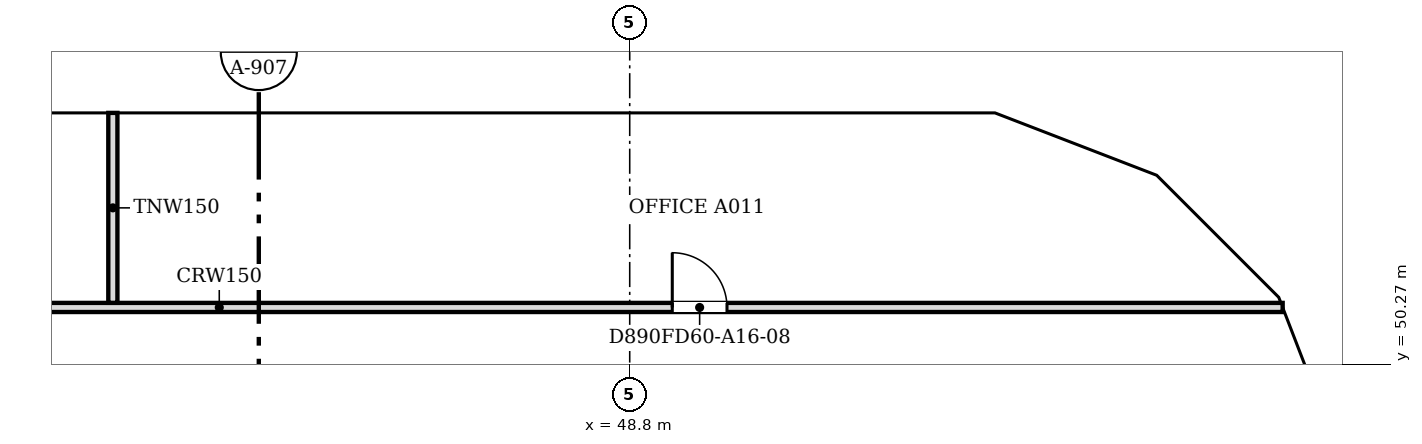
"""IFC4 building model, lengths in metres.
Left out: names, types, materials, properties, quantities, classifications, styles, units other than length and angle.
Written with IfcOpenShell. Run it as: python <this file> out.ifc"""

import sys

from ifc_helpers import new_model, si_unit, direction, frame, frame_2d, origin, place, context, subcontext, project, spatial, polyline, rectangle, outline, extrude, faceted_brep, source, transform, mapped, element, fill, save


model = new_model("IFC4")
c1 = context("Model", 3, precision=1e-05, world=origin(), true_north=direction((0.0, 1.0)))
c2 = subcontext(c1, "Body", "Model", "MODEL_VIEW")
j1 = project(units=[si_unit("LENGTHUNIT", "METRE"), si_unit("PLANEANGLEUNIT", "RADIAN")], contexts=[c1])
p1 = place(None, origin())
s1 = spatial("IfcSite", under=j1, at=p1, CompositionType="ELEMENT")
p2 = place(p1, origin())
s2 = spatial("IfcBuilding", under=s1, at=p2, CompositionType="ELEMENT")
p3 = place(p2, frame((0.0, 0.0, 178.2)))
s3 = spatial("IfcBuildingStorey", under=s2, at=p3, CompositionType="ELEMENT", Elevation=178.2)
m1 = source(origin(), c2, "Body", "Brep", [
    faceted_brep([(2.95, -0.25, 0.0), (3.003, -0.25, 0.068), (3.003, -0.25, 7.532), (2.95, -0.25, 7.6), (0.0, -0.25, 3.8), (0.047, 0.25, 3.86), (2.898, 0.25, 7.532), (2.898, 0.25, 0.068), (0.047, 0.25, 3.74), (2.95, 0.0, 0.0), (2.95, 0.0, 7.6), (0.0, 0.0, 3.8)], [[[0, 1, 2, 3, 4]], [[5, 6, 7, 8]], [[1, 0, 9]], [[10, 3, 2]], [[6, 5, 11, 4, 3, 10]], [[8, 7, 9, 0, 4, 11]], [[8, 11, 5]], [[1, 9, 7, 6, 10, 2]]]),
])
p4 = place(p3, frame((60.75, 48.753, -3.8), z_axis=(0.0, 0.0, 1.0), x_axis=(-0.35992665181, 0.932980602862, 0.0)))
e1 = element("IfcWall", 1, at=p4, inside=s3, PredefinedType="SOLIDWALL", context=c2, shape_type="MappedRepresentation", body=[
    mapped(m1, transform((0.0, 0.0, 0.0), scale=1.0)),
])
m2 = source(origin(), c2, "Body", "SweptSolid", [
    extrude(outline(polyline([(2.75, 6.935), (0.316, 3.8), (2.75, 0.665), (2.75, 6.935)])), frame((0.0, 0.26, 0.0), z_axis=(0.0, -1.0, 0.0), x_axis=(1.0, 0.0, 0.0)), (0.0, 0.0, 1.0), 0.52),
])
p5 = place(p4, origin())
e2 = element("IfcOpeningElement", 2, at=p5, cuts=e1, PredefinedType="OPENING", context=c2, shape_type="MappedRepresentation", body=[
    mapped(m2, transform((0.0, 0.0, 0.0), scale=1.0)),
])
m3 = source(origin(), c2, "Body", "Brep", [
    faceted_brep([(0.053, -0.25, 0.0), (2.997, -0.25, 3.8), (0.053, -0.25, 7.6), (0.0, -0.25, 7.532), (0.0, -0.25, 0.068), (0.106, 0.25, 7.532), (2.944, 0.25, 3.868), (2.944, 0.25, 3.732), (0.106, 0.25, 0.068), (2.997, 0.0, 3.8), (0.053, 0.0, 0.0), (0.053, 0.0, 7.6)], [[[0, 1, 2, 3, 4]], [[5, 6, 7, 8]], [[8, 7, 9, 1, 0, 10]], [[6, 5, 11, 2, 1, 9]], [[3, 2, 11]], [[10, 0, 4]], [[8, 10, 4, 3, 11, 5]], [[9, 7, 6]]]),
])
p6 = place(p3, frame((59.726, 51.469, -3.8), z_axis=(0.0, 0.0, 1.0), x_axis=(-0.707106781187, 0.707106781187, 0.0)))
e3 = element("IfcWall", 3, at=p6, inside=s3, PredefinedType="SOLIDWALL", context=c2, shape_type="MappedRepresentation", body=[
    mapped(m3, transform((0.0, 0.0, 0.0), scale=1.0)),
])
m4 = source(origin(), c2, "Body", "SweptSolid", [
    extrude(outline(polyline([(0.253, 0.667), (2.681, 3.8), (0.253, 6.934), (0.253, 0.667)])), frame((0.0, 0.26, 0.0), z_axis=(0.0, -1.0, 0.0), x_axis=(1.0, 0.0, 0.0)), (0.0, 0.0, 1.0), 0.52),
])
p7 = place(p6, origin())
e4 = element("IfcOpeningElement", 4, at=p7, cuts=e3, PredefinedType="OPENING", context=c2, shape_type="MappedRepresentation", body=[
    mapped(m4, transform((0.0, 0.0, 0.0), scale=1.0)),
])
m5 = source(origin(), c2, "Body", "Brep", [
    faceted_brep([(2.95, -0.25, 0.0), (2.997, -0.25, 0.059), (2.997, -0.25, 7.541), (2.95, -0.25, 7.6), (0.0, -0.25, 3.8), (0.053, 0.25, 3.868), (2.904, 0.25, 7.54), (2.904, 0.25, 0.06), (0.053, 0.25, 3.732), (2.95, 0.0, 0.0), (2.95, 0.0, 7.6), (0.0, 0.0, 3.8)], [[[0, 1, 2, 3, 4]], [[5, 6, 7, 8]], [[1, 0, 9]], [[10, 3, 2]], [[6, 5, 11, 4, 3, 10]], [[8, 7, 9, 0, 4, 11]], [[8, 11, 5]], [[1, 9, 7, 6, 10, 2]]]),
])
p8 = place(p3, frame((57.606, 53.588, -3.8), z_axis=(0.0, 0.0, 1.0), x_axis=(-0.932990326376, 0.359901446078, 0.0)))
e5 = element("IfcWall", 5, at=p8, inside=s3, PredefinedType="SOLIDWALL", context=c2, shape_type="MappedRepresentation", body=[
    mapped(m5, transform((0.0, 0.0, 0.0), scale=1.0)),
])
p9 = place(p8, origin())
e6 = element("IfcOpeningElement", 6, at=p9, cuts=e5, PredefinedType="OPENING", context=c2, shape_type="MappedRepresentation", body=[
    mapped(m2, transform((0.0, 0.0, 0.0), scale=1.0)),
])
m6 = source(origin(), c2, "Body", "Brep", [
    faceted_brep([(0.047, -0.25, 0.0), (3.05, -0.25, 3.8), (0.047, -0.25, 7.6), (0.0, -0.25, 7.54), (0.0, -0.25, 0.06), (0.093, 0.25, 7.541), (3.05, 0.25, 3.8), (0.093, 0.25, 0.059), (0.047, 0.0, 0.0), (0.047, 0.0, 7.6)], [[[0, 1, 2, 3, 4]], [[5, 6, 7]], [[7, 6, 1, 0, 8]], [[6, 5, 9, 2, 1]], [[3, 2, 9]], [[8, 0, 4]], [[7, 8, 4, 3, 9, 5]]]),
])
p10 = place(p3, frame((54.9, 54.65, -3.8), z_axis=(0.0, 0.0, 1.0), x_axis=(-1.0, 0.0, 0.0)))
e7 = element("IfcWall", 7, at=p10, inside=s3, PredefinedType="SOLIDWALL", context=c2, shape_type="MappedRepresentation", body=[
    mapped(m6, transform((0.0, 0.0, 0.0), scale=1.0)),
])
m7 = source(origin(), c2, "Body", "SweptSolid", [
    extrude(outline(polyline([(0.247, 0.656), (2.731, 3.8), (0.247, 6.944), (0.247, 0.656)])), frame((0.0, 0.26, 0.0), z_axis=(0.0, -1.0, 0.0), x_axis=(1.0, 0.0, 0.0)), (0.0, 0.0, 1.0), 0.52),
])
p11 = place(p10, origin())
e8 = element("IfcOpeningElement", 8, at=p11, cuts=e7, PredefinedType="OPENING", context=c2, shape_type="MappedRepresentation", body=[
    mapped(m7, transform((0.0, 0.0, 0.0), scale=1.0)),
])
m8 = source(origin(), c2, "Body", "SweptSolid", [
    extrude(outline(polyline([(3.05, 0.0), (6.1, 3.8), (3.05, 7.6), (0.0, 3.8), (3.05, 0.0)])), frame((0.0, 0.25, 0.0), z_axis=(0.0, -1.0, 0.0), x_axis=(1.0, 0.0, 0.0)), (0.0, 0.0, 1.0), 0.5),
])
p12 = place(p3, frame((51.85, 54.65, -3.8), z_axis=(0.0, 0.0, 1.0), x_axis=(-1.0, 0.0, 0.0)))
e9 = element("IfcWall", 9, at=p12, inside=s3, PredefinedType="SOLIDWALL", context=c2, shape_type="MappedRepresentation", body=[
    mapped(m8, transform((0.0, 0.0, 0.0), scale=1.0)),
])
m9 = source(origin(), c2, "Body", "SweptSolid", [
    extrude(outline(polyline([(3.05, 0.399), (5.78, 3.8), (3.05, 7.201), (0.321, 3.8), (3.05, 0.399)])), frame((0.0, 0.26, 0.0), z_axis=(0.0, -1.0, 0.0), x_axis=(1.0, 0.0, 0.0)), (0.0, 0.0, 1.0), 0.52),
])
p13 = place(p12, origin())
e10 = element("IfcOpeningElement", 10, at=p13, cuts=e9, PredefinedType="OPENING", context=c2, shape_type="MappedRepresentation", body=[
    mapped(m9, transform((0.0, 0.0, 0.0), scale=1.0)),
])
p14 = place(p3, frame((45.75, 54.65, -3.8), z_axis=(0.0, 0.0, 1.0), x_axis=(-1.0, 0.0, 0.0)))
e11 = element("IfcWall", 11, at=p14, inside=s3, PredefinedType="SOLIDWALL", context=c2, shape_type="MappedRepresentation", body=[
    mapped(m8, transform((0.0, 0.0, 0.0), scale=1.0)),
])
p15 = place(p14, origin())
e12 = element("IfcOpeningElement", 12, at=p15, cuts=e11, PredefinedType="OPENING", context=c2, shape_type="MappedRepresentation", body=[
    mapped(m9, transform((0.0, 0.0, 0.0), scale=1.0)),
])
m10 = source(origin(), c2, "Body", "Brep", [
    faceted_brep([(3.05, -0.25, 0.0), (6.1, -0.25, 3.8), (6.1, -0.25, 3.8), (3.05, -0.25, 7.6), (0.0, -0.25, 3.8), (0.0, 0.25, 3.8), (3.05, 0.25, 7.6), (6.1, 0.25, 3.8), (6.1, 0.25, 3.8), (3.05, 0.25, 0.0)], [[[0, 1, 2, 3, 4]], [[5, 6, 7, 8, 9]], [[9, 8, 1, 0]], [[7, 6, 3, 2]], [[6, 5, 4, 3]], [[5, 9, 0, 4]], [[1, 8, 7, 2]]]),
])
p16 = place(p3, frame((39.65, 54.65, -3.8), z_axis=(0.0, 0.0, 1.0), x_axis=(-1.0, 0.0, 0.0)))
e13 = element("IfcWall", 13, at=p16, inside=s3, PredefinedType="SOLIDWALL", context=c2, shape_type="MappedRepresentation", body=[
    mapped(m10, transform((0.0, 0.0, 0.0), scale=1.0)),
])
p17 = place(p16, origin())
e14 = element("IfcOpeningElement", 14, at=p17, cuts=e13, PredefinedType="OPENING", context=c2, shape_type="MappedRepresentation", body=[
    mapped(m9, transform((0.0, 0.0, 0.0), scale=1.0)),
])
p18 = place(p2, frame((0.0, 0.0, 182.0)))
s4 = spatial("IfcBuildingStorey", under=s2, at=p18, CompositionType="ELEMENT", Elevation=182.0)
m11 = source(origin(), c2, "Body", "Brep", [
    faceted_brep([(0.047, -0.25, 0.0), (2.997, -0.25, 3.8), (0.047, -0.25, 7.6), (0.0, -0.25, 7.541), (0.0, -0.25, 0.059), (0.093, 0.25, 7.54), (2.944, 0.25, 3.868), (2.944, 0.25, 3.732), (0.093, 0.25, 0.06), (2.997, 0.0, 3.8), (0.047, 0.0, 0.0), (0.047, 0.0, 7.6)], [[[0, 1, 2, 3, 4]], [[5, 6, 7, 8]], [[8, 7, 9, 1, 0, 10]], [[6, 5, 11, 2, 1, 9]], [[3, 2, 11]], [[10, 0, 4]], [[8, 10, 4, 3, 11, 5]], [[9, 7, 6]]]),
])
p19 = place(p18, frame((60.767, 48.71, -3.8), z_axis=(0.0, 0.0, 1.0), x_axis=(-0.359901446078, 0.932990326376, 0.0)))
e15 = element("IfcWall", 15, at=p19, inside=s4, PredefinedType="SOLIDWALL", context=c2, shape_type="MappedRepresentation", body=[
    mapped(m11, transform((0.0, 0.0, 0.0), scale=1.0)),
])
m12 = source(origin(), c2, "Body", "SweptSolid", [
    extrude(outline(polyline([(0.247, 0.665), (2.681, 3.8), (0.247, 6.935), (0.247, 0.665)])), frame((0.0, 0.26, 0.0), z_axis=(0.0, -1.0, 0.0), x_axis=(1.0, 0.0, 0.0)), (0.0, 0.0, 1.0), 0.52),
])
p20 = place(p19, origin())
e16 = element("IfcOpeningElement", 16, at=p20, cuts=e15, PredefinedType="OPENING", context=c2, shape_type="MappedRepresentation", body=[
    mapped(m12, transform((0.0, 0.0, 0.0), scale=1.0)),
])
m13 = source(origin(), c2, "Body", "Brep", [
    faceted_brep([(2.944, -0.25, 0.0), (2.997, -0.25, 0.068), (2.997, -0.25, 7.532), (2.944, -0.25, 7.6), (0.0, -0.25, 3.8), (0.053, 0.25, 3.868), (2.891, 0.25, 7.532), (2.891, 0.25, 0.068), (0.053, 0.25, 3.732), (2.944, 0.0, 0.0), (2.944, 0.0, 7.6), (0.0, 0.0, 3.8)], [[[0, 1, 2, 3, 4]], [[5, 6, 7, 8]], [[1, 0, 9]], [[10, 3, 2]], [[6, 5, 11, 4, 3, 10]], [[8, 7, 9, 0, 4, 11]], [[8, 11, 5]], [[1, 9, 7, 6, 10, 2]]]),
])
p21 = place(p18, frame((59.688, 51.506, -3.8), z_axis=(0.0, 0.0, 1.0), x_axis=(-0.707106781187, 0.707106781187, 0.0)))
e17 = element("IfcWall", 17, at=p21, inside=s4, PredefinedType="SOLIDWALL", context=c2, shape_type="MappedRepresentation", body=[
    mapped(m13, transform((0.0, 0.0, 0.0), scale=1.0)),
])
m14 = source(origin(), c2, "Body", "SweptSolid", [
    extrude(outline(polyline([(2.744, 6.934), (0.316, 3.8), (2.744, 0.666), (2.744, 6.934)])), frame((0.0, 0.26, 0.0), z_axis=(0.0, -1.0, 0.0), x_axis=(1.0, 0.0, 0.0)), (0.0, 0.0, 1.0), 0.52),
])
p22 = place(p21, origin())
e18 = element("IfcOpeningElement", 18, at=p22, cuts=e17, PredefinedType="OPENING", context=c2, shape_type="MappedRepresentation", body=[
    mapped(m14, transform((0.0, 0.0, 0.0), scale=1.0)),
])
m15 = source(origin(), c2, "Body", "Brep", [
    faceted_brep([(0.053, -0.25, 0.0), (3.003, -0.25, 3.8), (0.053, -0.25, 7.6), (0.0, -0.25, 7.532), (0.0, -0.25, 0.068), (0.106, 0.25, 7.532), (2.957, 0.25, 3.86), (2.957, 0.25, 3.74), (0.106, 0.25, 0.068), (3.003, 0.0, 3.8), (0.053, 0.0, 0.0), (0.053, 0.0, 7.6)], [[[0, 1, 2, 3, 4]], [[5, 6, 7, 8]], [[8, 7, 9, 1, 0, 10]], [[6, 5, 11, 2, 1, 9]], [[3, 2, 11]], [[10, 0, 4]], [[8, 10, 4, 3, 11, 5]], [[9, 7, 6]]]),
])
p23 = place(p18, frame((57.656, 53.569, -3.8), z_axis=(0.0, 0.0, 1.0), x_axis=(-0.933007896601, 0.359855894603, 0.0)))
e19 = element("IfcWall", 19, at=p23, inside=s4, PredefinedType="SOLIDWALL", context=c2, shape_type="MappedRepresentation", body=[
    mapped(m15, transform((0.0, 0.0, 0.0), scale=1.0)),
])
m16 = source(origin(), c2, "Body", "SweptSolid", [
    extrude(outline(polyline([(0.253, 0.665), (2.687, 3.8), (0.253, 6.935), (0.253, 0.665)])), frame((0.0, 0.26, 0.0), z_axis=(0.0, -1.0, 0.0), x_axis=(1.0, 0.0, 0.0)), (0.0, 0.0, 1.0), 0.52),
])
p24 = place(p23, origin())
e20 = element("IfcOpeningElement", 20, at=p24, cuts=e19, PredefinedType="OPENING", context=c2, shape_type="MappedRepresentation", body=[
    mapped(m16, transform((0.0, 0.0, 0.0), scale=1.0)),
])
m17 = source(origin(), c2, "Body", "Brep", [
    faceted_brep([(3.003, -0.25, 0.0), (6.053, -0.25, 3.8), (3.003, -0.25, 7.6), (0.0, -0.25, 3.8), (0.047, 0.25, 3.859), (3.003, 0.25, 7.6), (6.053, 0.25, 3.8), (3.003, 0.25, 0.0), (0.047, 0.25, 3.741), (0.0, 0.0, 3.8)], [[[0, 1, 2, 3]], [[4, 5, 6, 7, 8]], [[7, 6, 1, 0]], [[6, 5, 2, 1]], [[5, 4, 9, 3, 2]], [[8, 7, 0, 3, 9]], [[8, 9, 4]]]),
])
p25 = place(p18, frame((54.854, 54.65, -3.8), z_axis=(0.0, 0.0, 1.0), x_axis=(-1.0, 0.0, 0.0)))
e21 = element("IfcWall", 21, at=p25, inside=s4, PredefinedType="SOLIDWALL", context=c2, shape_type="MappedRepresentation", body=[
    mapped(m17, transform((0.0, 0.0, 0.0), scale=1.0)),
])
m18 = source(origin(), c2, "Body", "SweptSolid", [
    extrude(outline(polyline([(3.005, 0.401), (5.733, 3.8), (3.005, 7.199), (0.319, 3.8), (3.005, 0.401)])), frame((0.0, 0.26, 0.0), z_axis=(0.0, -1.0, 0.0), x_axis=(1.0, 0.0, 0.0)), (0.0, 0.0, 1.0), 0.52),
])
p26 = place(p25, origin())
e22 = element("IfcOpeningElement", 22, at=p26, cuts=e21, PredefinedType="OPENING", context=c2, shape_type="MappedRepresentation", body=[
    mapped(m18, transform((0.0, 0.0, 0.0), scale=1.0)),
])
p27 = place(p18, frame((48.8, 54.65, -3.8), z_axis=(0.0, 0.0, 1.0), x_axis=(-1.0, 0.0, 0.0)))
e23 = element("IfcWall", 23, at=p27, inside=s4, PredefinedType="SOLIDWALL", context=c2, shape_type="MappedRepresentation", body=[
    mapped(m8, transform((0.0, 0.0, 0.0), scale=1.0)),
])
p28 = place(p27, origin())
e24 = element("IfcOpeningElement", 24, at=p28, cuts=e23, PredefinedType="OPENING", context=c2, shape_type="MappedRepresentation", body=[
    mapped(m9, transform((0.0, 0.0, 0.0), scale=1.0)),
])
p29 = place(p18, frame((42.7, 54.65, -3.8), z_axis=(0.0, 0.0, 1.0), x_axis=(-1.0, 0.0, 0.0)))
e25 = element("IfcWall", 25, at=p29, inside=s4, PredefinedType="SOLIDWALL", context=c2, shape_type="MappedRepresentation", body=[
    mapped(m10, transform((0.0, 0.0, 0.0), scale=1.0)),
])
p30 = place(p29, origin())
e26 = element("IfcOpeningElement", 26, at=p30, cuts=e25, PredefinedType="OPENING", context=c2, shape_type="MappedRepresentation", body=[
    mapped(m9, transform((0.0, 0.0, 0.0), scale=1.0)),
])
p31 = place(p3, frame((28.1, 51.2, 0.0), z_axis=(0.0, 0.0, 1.0), x_axis=(1.0, 0.0, 0.0)))
e27 = element("IfcWall", 27, at=p31, inside=s3, PredefinedType="PARTITIONING", context=c2, shape_type="SweptSolid", body=[
    extrude(rectangle(XDim=31.438, YDim=0.15, at=frame_2d((15.719, 0.0))), origin(), (0.0, 0.0, 1.0), 3.067),
])
m19 = source(origin(), c2, "Body", "SweptSolid", [
    extrude(rectangle(XDim=0.9, YDim=2.1, at=frame_2d((0.45, 1.05))), frame((0.0, 0.085, 0.0), z_axis=(0.0, -1.0, 0.0), x_axis=(1.0, 0.0, 0.0)), (0.0, 0.0, 1.0), 0.17),
])
p32 = place(p31, frame((5.6, 0.0, 0.0)))
e28 = element("IfcOpeningElement", 28, at=p32, cuts=e27, PredefinedType="OPENING", context=c2, shape_type="MappedRepresentation", body=[
    mapped(m19, transform((0.0, 0.0, 0.0), scale=1.0)),
])
p33 = place(p31, frame((21.4, 0.0, 0.0)))
e29 = element("IfcOpeningElement", 29, at=p33, cuts=e27, PredefinedType="OPENING", context=c2, shape_type="MappedRepresentation", body=[
    mapped(m19, transform((0.0, 0.0, 0.0), scale=1.0)),
])
p34 = place(p3, frame((40.3, 51.276, 0.0), z_axis=(0.0, 0.0, 1.0), x_axis=(0.0, 1.0, 0.0)))
e30 = element("IfcWall", 30, at=p34, inside=s3, PredefinedType="PARTITIONING", context=c2, shape_type="SweptSolid", body=[
    extrude(rectangle(XDim=3.124, YDim=0.15, at=frame_2d((1.562, 0.0))), origin(), (0.0, 0.0, 1.0), 3.067),
])
m20 = source(origin(), c2, "Body", "SweptSolid", [
    extrude(rectangle(XDim=0.9, YDim=2.1, at=frame_2d((0.45, 1.05))), frame((0.0, 0.025, 0.0), z_axis=(0.0, -1.0, 0.0), x_axis=(1.0, 0.0, 0.0)), (0.0, 0.0, 1.0), 0.05),
])
p35 = place(p33, origin())
e31 = element("IfcDoor", 31, at=p35, inside=s3, OperationType="SINGLE_SWING_LEFT", PredefinedType="DOOR", context=c2, shape_type="MappedRepresentation", body=[
    mapped(m20, transform((0.0, 0.0, 0.0), scale=1.0)),
])
fill(e29, e31)
save(model, sys.argv[1])
